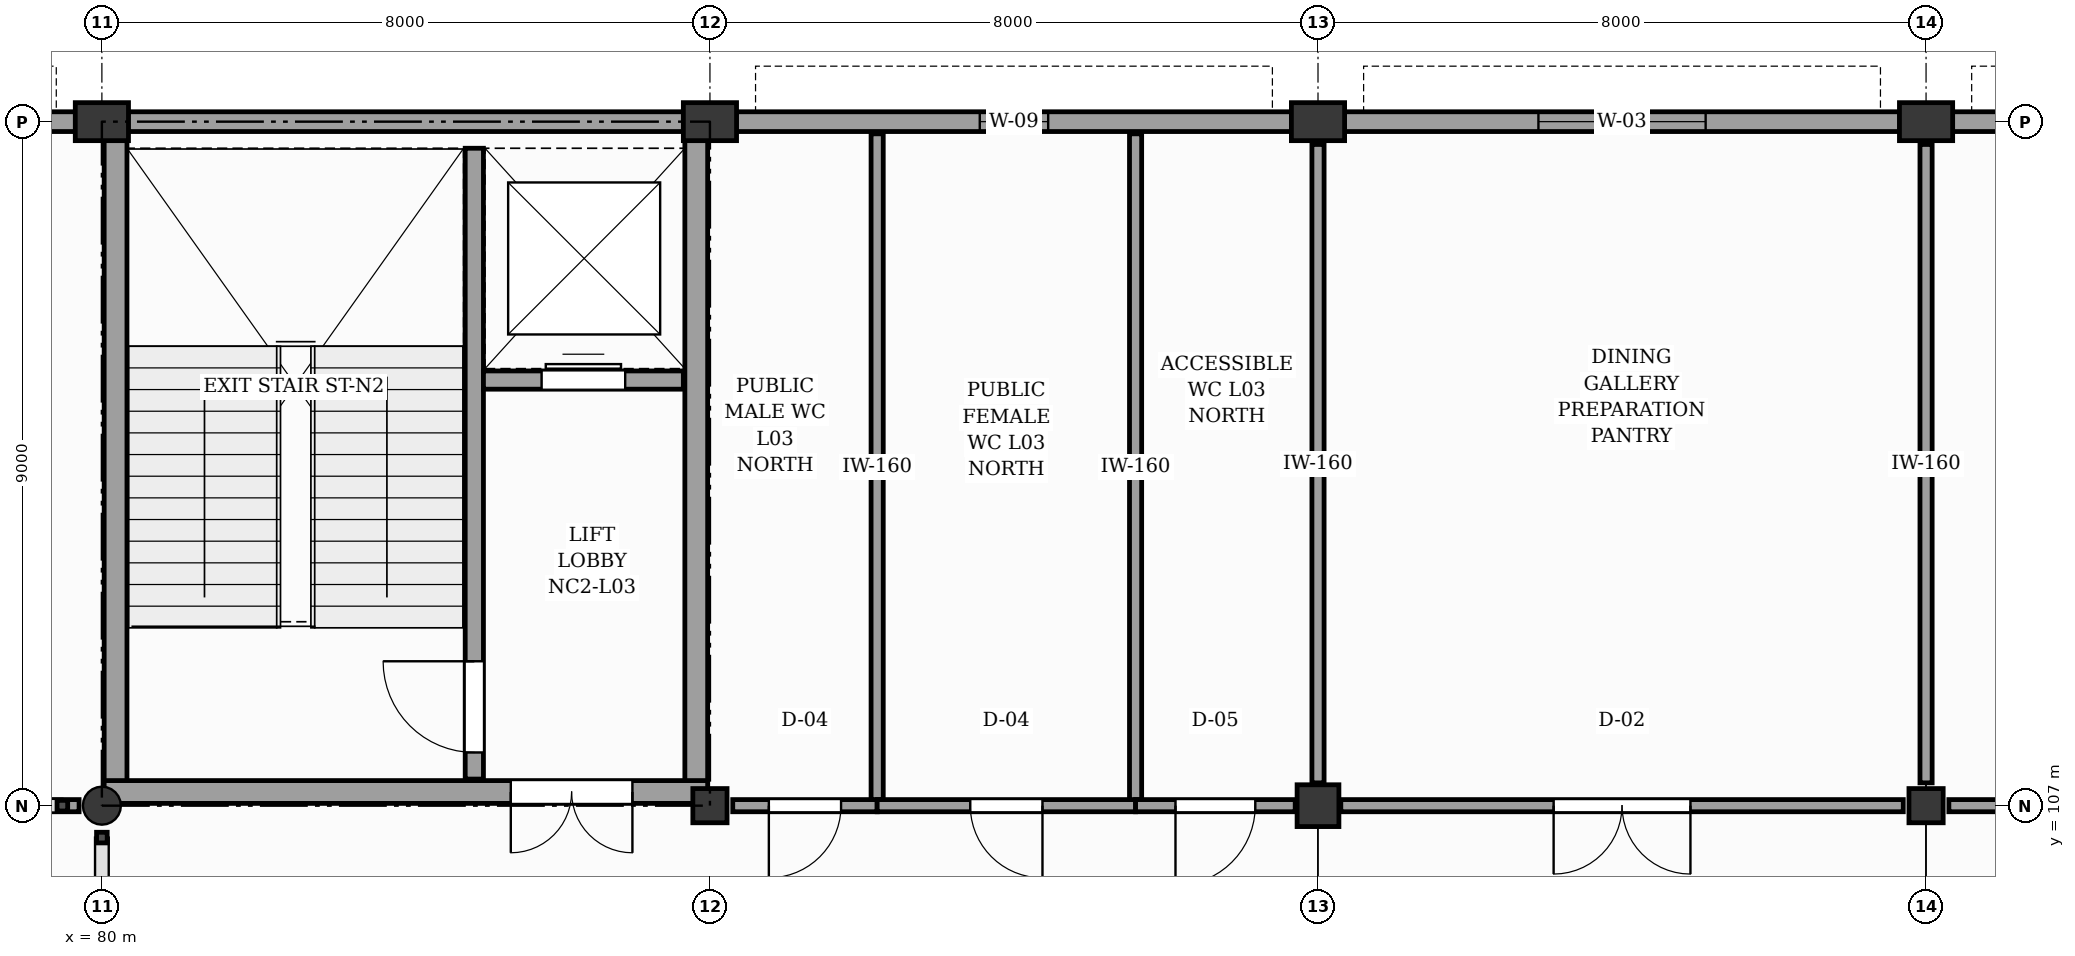
"""IFC4 building model, lengths in metres.
Left out: names, types, materials, properties, quantities, classifications, styles, units other than length and angle.
Written with IfcOpenShell. Run it as: python <this file> out.ifc"""

import sys

from ifc_helpers import new_model, si_unit, direction, frame, frame_2d, origin, origin_2d, place, context, subcontext, project, spatial, rectangle, circle, extrude, element, fill, save


model = new_model("IFC4")
c1 = context("Model", 3, precision=1e-05, world=origin(), true_north=direction((0.0, 1.0)))
c2 = subcontext(c1, "Body", "Model", "MODEL_VIEW")
j1 = project(units=[si_unit("LENGTHUNIT", "METRE"), si_unit("PLANEANGLEUNIT", "RADIAN")], contexts=[c1])
p1 = place(None, origin())
s1 = spatial("IfcSite", under=j1, at=p1, CompositionType="ELEMENT")
p2 = place(p1, origin())
s2 = spatial("IfcBuilding", under=s1, at=p2, CompositionType="ELEMENT")
p3 = place(p2, frame((0.0, 0.0, 16.2)))
s3 = spatial("IfcBuildingStorey", under=s2, at=p3, CompositionType="ELEMENT", Elevation=16.2)
p4 = place(p3, frame((80.0, 107.0, 0.0), z_axis=(0.0, 0.0, 1.0), x_axis=(1.0, 0.0, 0.0)))
e1 = element("IfcColumn", 1, at=p4, inside=s3, PredefinedType="COLUMN", context=c2, shape_type="SweptSolid", body=[
    extrude(circle(Radius=0.25, at=origin_2d()), origin(), (0.0, 0.0, 1.0), 4.2),
])
p5 = place(p3, frame((80.0, 116.0, 0.0), z_axis=(0.0, 0.0, 1.0), x_axis=(1.0, 0.0, 0.0)))
e2 = element("IfcColumn", 2, at=p5, inside=s3, PredefinedType="PILASTER", context=c2, shape_type="SweptSolid", body=[
    extrude(rectangle(XDim=0.7, YDim=0.5, at=origin_2d()), origin(), (0.0, 0.0, 1.0), 4.2),
])
p6 = place(p3, frame((88.0, 107.0, 0.0), z_axis=(0.0, 0.0, 1.0), x_axis=(1.0, 0.0, 0.0)))
e3 = element("IfcColumn", 3, at=p6, inside=s3, PredefinedType="COLUMN", context=c2, shape_type="SweptSolid", body=[
    extrude(rectangle(XDim=0.45, YDim=0.45, at=origin_2d()), origin(), (0.0, 0.0, 1.0), 4.2),
])
p7 = place(p3, frame((88.0, 116.0, 0.0), z_axis=(0.0, 0.0, 1.0), x_axis=(1.0, 0.0, 0.0)))
e4 = element("IfcColumn", 4, at=p7, inside=s3, PredefinedType="PILASTER", context=c2, shape_type="SweptSolid", body=[
    extrude(rectangle(XDim=0.7, YDim=0.5, at=origin_2d()), origin(), (0.0, 0.0, 1.0), 4.2),
])
p8 = place(p3, frame((96.0, 107.0, 0.0), z_axis=(0.0, 0.0, 1.0), x_axis=(1.0, 0.0, 0.0)))
e5 = element("IfcColumn", 5, at=p8, inside=s3, PredefinedType="COLUMN", context=c2, shape_type="SweptSolid", body=[
    extrude(rectangle(XDim=0.55, YDim=0.55, at=origin_2d()), origin(), (0.0, 0.0, 1.0), 4.2),
])
p9 = place(p3, frame((96.0, 116.0, 0.0), z_axis=(0.0, 0.0, 1.0), x_axis=(1.0, 0.0, 0.0)))
e6 = element("IfcColumn", 6, at=p9, inside=s3, PredefinedType="PILASTER", context=c2, shape_type="SweptSolid", body=[
    extrude(rectangle(XDim=0.7, YDim=0.5, at=origin_2d()), origin(), (0.0, 0.0, 1.0), 4.2),
])
p10 = place(p3, frame((104.0, 107.0, 0.0), z_axis=(0.0, 0.0, 1.0), x_axis=(1.0, 0.0, 0.0)))
e7 = element("IfcColumn", 7, at=p10, inside=s3, PredefinedType="COLUMN", context=c2, shape_type="SweptSolid", body=[
    extrude(rectangle(XDim=0.45, YDim=0.45, at=origin_2d()), origin(), (0.0, 0.0, 1.0), 4.2),
])
p11 = place(p3, frame((104.0, 116.0, 0.0), z_axis=(0.0, 0.0, 1.0), x_axis=(1.0, 0.0, 0.0)))
e8 = element("IfcColumn", 8, at=p11, inside=s3, PredefinedType="PILASTER", context=c2, shape_type="SweptSolid", body=[
    extrude(rectangle(XDim=0.7, YDim=0.5, at=origin_2d()), origin(), (0.0, 0.0, 1.0), 4.2),
])
p12 = place(p3, frame((72.345, 116.0, 0.0), z_axis=(0.0, 0.0, 1.0), x_axis=(1.0, 0.0, 0.0)))
e9 = element("IfcWall", 9, at=p12, inside=s3, PredefinedType="SOLIDWALL", context=c2, shape_type="SweptSolid", body=[
    extrude(rectangle(XDim=7.31, YDim=0.26, at=frame_2d((3.655, 0.0))), origin(), (0.0, 0.0, 1.0), 3.21),
])
p13 = place(p12, frame((2.555, 0.0, 0.9)))
e10 = element("IfcOpeningElement", 10, at=p13, cuts=e9, PredefinedType="OPENING", context=c2, shape_type="SweptSolid", body=[
    extrude(rectangle(XDim=2.2, YDim=1.99, at=frame_2d((1.1, 0.995))), frame((0.0, 0.14, 0.0), z_axis=(0.0, -1.0, 0.0), x_axis=(1.0, 0.0, 0.0)), (0.0, 0.0, 1.0), 0.28),
])
p14 = place(p3, frame((80.345, 116.0, 0.0), z_axis=(0.0, 0.0, 1.0), x_axis=(1.0, 0.0, 0.0)))
e11 = element("IfcWall", 11, at=p14, inside=s3, PredefinedType="SOLIDWALL", context=c2, shape_type="SweptSolid", body=[
    extrude(rectangle(XDim=7.31, YDim=0.26, at=frame_2d((3.655, 0.0))), origin(), (0.0, 0.0, 1.0), 3.21),
])
p15 = place(p3, frame((88.345, 116.0, 0.0), z_axis=(0.0, 0.0, 1.0), x_axis=(1.0, 0.0, 0.0)))
e12 = element("IfcWall", 12, at=p15, inside=s3, PredefinedType="SOLIDWALL", context=c2, shape_type="SweptSolid", body=[
    extrude(rectangle(XDim=7.31, YDim=0.26, at=frame_2d((3.655, 0.0))), origin(), (0.0, 0.0, 1.0), 3.21),
])
p16 = place(p15, frame((3.205, 0.0, 0.9)))
e13 = element("IfcOpeningElement", 13, at=p16, cuts=e12, PredefinedType="OPENING", context=c2, shape_type="SweptSolid", body=[
    extrude(rectangle(XDim=0.9, YDim=1.1, at=frame_2d((0.45, 0.55))), frame((0.0, 0.14, 0.0), z_axis=(0.0, -1.0, 0.0), x_axis=(1.0, 0.0, 0.0)), (0.0, 0.0, 1.0), 0.28),
])
p17 = place(p3, frame((96.345, 116.0, 0.0), z_axis=(0.0, 0.0, 1.0), x_axis=(1.0, 0.0, 0.0)))
e14 = element("IfcWall", 14, at=p17, inside=s3, PredefinedType="SOLIDWALL", context=c2, shape_type="SweptSolid", body=[
    extrude(rectangle(XDim=7.31, YDim=0.26, at=frame_2d((3.655, 0.0))), origin(), (0.0, 0.0, 1.0), 3.21),
])
p18 = place(p17, frame((2.555, 0.0, 0.9)))
e15 = element("IfcOpeningElement", 15, at=p18, cuts=e14, PredefinedType="OPENING", context=c2, shape_type="SweptSolid", body=[
    extrude(rectangle(XDim=2.2, YDim=1.99, at=frame_2d((1.1, 0.995))), frame((0.0, 0.14, 0.0), z_axis=(0.0, -1.0, 0.0), x_axis=(1.0, 0.0, 0.0)), (0.0, 0.0, 1.0), 0.28),
])
p19 = place(p3, frame((104.345, 116.0, 0.0), z_axis=(0.0, 0.0, 1.0), x_axis=(1.0, 0.0, 0.0)))
e16 = element("IfcWall", 16, at=p19, inside=s3, PredefinedType="SOLIDWALL", context=c2, shape_type="SweptSolid", body=[
    extrude(rectangle(XDim=7.31, YDim=0.26, at=frame_2d((3.655, 0.0))), origin(), (0.0, 0.0, 1.0), 3.21),
])
p20 = place(p19, frame((2.555, 0.0, 0.9)))
e17 = element("IfcOpeningElement", 17, at=p20, cuts=e16, PredefinedType="OPENING", context=c2, shape_type="SweptSolid", body=[
    extrude(rectangle(XDim=2.2, YDim=1.99, at=frame_2d((1.1, 0.995))), frame((0.0, 0.14, 0.0), z_axis=(0.0, -1.0, 0.0), x_axis=(1.0, 0.0, 0.0)), (0.0, 0.0, 1.0), 0.28),
])
p21 = place(p3, frame((84.9, 107.35, 0.0), z_axis=(0.0, 0.0, 1.0), x_axis=(0.0, 1.0, 0.0)))
e18 = element("IfcWall", 18, at=p21, inside=s3, PredefinedType="SHEAR", context=c2, shape_type="SweptSolid", body=[
    extrude(rectangle(XDim=8.3, YDim=0.24, at=frame_2d((4.15, 0.0))), origin(), (0.0, 0.0, 1.0), 3.92),
])
p22 = place(p21, frame((0.35, 0.0, 0.0)))
e19 = element("IfcOpeningElement", 19, at=p22, cuts=e18, PredefinedType="OPENING", context=c2, shape_type="SweptSolid", body=[
    extrude(rectangle(XDim=1.2, YDim=2.15, at=frame_2d((0.6, 1.075))), frame((0.0, 0.13, 0.0), z_axis=(0.0, -1.0, 0.0), x_axis=(1.0, 0.0, 0.0)), (0.0, 0.0, 1.0), 0.26),
])
p23 = place(p3, frame((85.02, 112.6, 0.0), z_axis=(0.0, 0.0, 1.0), x_axis=(1.0, 0.0, 0.0)))
e20 = element("IfcWall", 20, at=p23, inside=s3, PredefinedType="SHEAR", context=c2, shape_type="SweptSolid", body=[
    extrude(rectangle(XDim=2.63, YDim=0.24, at=frame_2d((1.315, 0.0))), origin(), (0.0, 0.0, 1.0), 3.92),
])
p24 = place(p23, frame((0.765, 0.0, 0.0)))
e21 = element("IfcOpeningElement", 21, at=p24, cuts=e20, PredefinedType="OPENING", context=c2, shape_type="SweptSolid", body=[
    extrude(rectangle(XDim=1.1, YDim=2.15, at=frame_2d((0.55, 1.075))), frame((0.0, 0.13, 0.0), z_axis=(0.0, -1.0, 0.0), x_axis=(1.0, 0.0, 0.0)), (0.0, 0.0, 1.0), 0.26),
])
for number, where, z_axis, x_axis in (
    (22, (80.18, 107.18, 0.0), (0.0, 0.0, 1.0), (0.0, 1.0, 0.0)),
    (23, (87.82, 107.18, 0.0), (0.0, 0.0, 1.0), (0.0, 1.0, 0.0)),
):
    element("IfcWall", number, at=place(p3, frame(where, z_axis=z_axis, x_axis=x_axis)), inside=s3, PredefinedType="SHEAR", context=c2, shape_type="SweptSolid", body=[
        extrude(rectangle(XDim=8.64, YDim=0.3, at=frame_2d((4.32, 0.0))), origin(), (0.0, 0.0, 1.0), 3.92),
    ])
p25 = place(p3, frame((80.03, 107.18, 0.0), z_axis=(0.0, 0.0, 1.0), x_axis=(1.0, 0.0, 0.0)))
e24 = element("IfcWall", 24, at=p25, inside=s3, PredefinedType="SHEAR", context=c2, shape_type="SweptSolid", body=[
    extrude(rectangle(XDim=7.94, YDim=0.3, at=frame_2d((3.97, 0.0))), origin(), (0.0, 0.0, 1.0), 3.92),
])
p26 = place(p25, frame((5.35, 0.0, 0.0)))
e25 = element("IfcOpeningElement", 25, at=p26, cuts=e24, PredefinedType="OPENING", context=c2, shape_type="SweptSolid", body=[
    extrude(rectangle(XDim=1.6, YDim=2.15, at=frame_2d((0.8, 1.075))), frame((0.0, 0.16, 0.0), z_axis=(0.0, -1.0, 0.0), x_axis=(1.0, 0.0, 0.0)), (0.0, 0.0, 1.0), 0.32),
])
p27 = place(p3, frame((76.0, 107.0, 0.0), z_axis=(0.0, 0.0, 1.0), x_axis=(1.0, 0.0, 0.0)))
e26 = element("IfcWall", 26, at=p27, inside=s3, PredefinedType="PARTITIONING", context=c2, shape_type="SweptSolid", body=[
    extrude(rectangle(XDim=3.7, YDim=0.16, at=frame_2d((1.85, 0.0))), origin(), (0.0, 0.0, 1.0), 3.1),
])
p28 = place(p27, frame((0.2, 0.0, 0.0)))
e27 = element("IfcOpeningElement", 27, at=p28, cuts=e26, PredefinedType="OPENING", context=c2, shape_type="SweptSolid", body=[
    extrude(rectangle(XDim=1.8, YDim=2.25, at=frame_2d((0.9, 1.125))), frame((0.0, 0.09, 0.0), z_axis=(0.0, -1.0, 0.0), x_axis=(1.0, 0.0, 0.0)), (0.0, 0.0, 1.0), 0.18),
])
p29 = place(p3, frame((88.3, 107.0, 0.0), z_axis=(0.0, 0.0, 1.0), x_axis=(1.0, 0.0, 0.0)))
e28 = element("IfcWall", 28, at=p29, inside=s3, PredefinedType="PARTITIONING", context=c2, shape_type="SweptSolid", body=[
    extrude(rectangle(XDim=1.9, YDim=0.16, at=frame_2d((0.95, 0.0))), origin(), (0.0, 0.0, 1.0), 3.1),
])
p30 = place(p29, frame((0.475, 0.0, 0.0)))
e29 = element("IfcOpeningElement", 29, at=p30, cuts=e28, PredefinedType="OPENING", context=c2, shape_type="SweptSolid", body=[
    extrude(rectangle(XDim=0.95, YDim=2.1, at=frame_2d((0.475, 1.05))), frame((0.0, 0.09, 0.0), z_axis=(0.0, -1.0, 0.0), x_axis=(1.0, 0.0, 0.0)), (0.0, 0.0, 1.0), 0.18),
])
p31 = place(p3, frame((90.2, 107.08, 0.0), z_axis=(0.0, 0.0, 1.0), x_axis=(0.0, 1.0, 0.0)))
e30 = element("IfcWall", 30, at=p31, inside=s3, PredefinedType="PARTITIONING", context=c2, shape_type="SweptSolid", body=[
    extrude(rectangle(XDim=8.76, YDim=0.16, at=frame_2d((4.38, 0.0))), origin(), (0.0, 0.0, 1.0), 3.1),
])
p32 = place(p3, frame((90.2, 107.0, 0.0), z_axis=(0.0, 0.0, 1.0), x_axis=(1.0, 0.0, 0.0)))
e31 = element("IfcWall", 31, at=p32, inside=s3, PredefinedType="PARTITIONING", context=c2, shape_type="SweptSolid", body=[
    extrude(rectangle(XDim=3.4, YDim=0.16, at=frame_2d((1.7, 0.0))), origin(), (0.0, 0.0, 1.0), 3.1),
])
p33 = place(p32, frame((1.225, 0.0, 0.0)))
e32 = element("IfcOpeningElement", 32, at=p33, cuts=e31, PredefinedType="OPENING", context=c2, shape_type="SweptSolid", body=[
    extrude(rectangle(XDim=0.95, YDim=2.1, at=frame_2d((0.475, 1.05))), frame((0.0, 0.09, 0.0), z_axis=(0.0, -1.0, 0.0), x_axis=(1.0, 0.0, 0.0)), (0.0, 0.0, 1.0), 0.18),
])
p34 = place(p3, frame((93.6, 107.08, 0.0), z_axis=(0.0, 0.0, 1.0), x_axis=(0.0, 1.0, 0.0)))
e33 = element("IfcWall", 33, at=p34, inside=s3, PredefinedType="PARTITIONING", context=c2, shape_type="SweptSolid", body=[
    extrude(rectangle(XDim=8.76, YDim=0.16, at=frame_2d((4.38, 0.0))), origin(), (0.0, 0.0, 1.0), 3.1),
])
p35 = place(p3, frame((93.6, 107.0, 0.0), z_axis=(0.0, 0.0, 1.0), x_axis=(1.0, 0.0, 0.0)))
e34 = element("IfcWall", 34, at=p35, inside=s3, PredefinedType="PARTITIONING", context=c2, shape_type="SweptSolid", body=[
    extrude(rectangle(XDim=2.1, YDim=0.16, at=frame_2d((1.05, 0.0))), origin(), (0.0, 0.0, 1.0), 3.1),
])
p36 = place(p35, frame((0.525, 0.0, 0.0)))
e35 = element("IfcOpeningElement", 35, at=p36, cuts=e34, PredefinedType="OPENING", context=c2, shape_type="SweptSolid", body=[
    extrude(rectangle(XDim=1.05, YDim=2.1, at=frame_2d((0.525, 1.05))), frame((0.0, 0.09, 0.0), z_axis=(0.0, -1.0, 0.0), x_axis=(1.0, 0.0, 0.0)), (0.0, 0.0, 1.0), 0.18),
])
p37 = place(p3, frame((96.0, 107.3, 0.0), z_axis=(0.0, 0.0, 1.0), x_axis=(0.0, 1.0, 0.0)))
e36 = element("IfcWall", 36, at=p37, inside=s3, PredefinedType="PARTITIONING", context=c2, shape_type="SweptSolid", body=[
    extrude(rectangle(XDim=8.4, YDim=0.16, at=frame_2d((4.2, 0.0))), origin(), (0.0, 0.0, 1.0), 3.1),
])
p38 = place(p3, frame((96.3, 107.0, 0.0), z_axis=(0.0, 0.0, 1.0), x_axis=(1.0, 0.0, 0.0)))
e37 = element("IfcWall", 37, at=p38, inside=s3, PredefinedType="PARTITIONING", context=c2, shape_type="SweptSolid", body=[
    extrude(rectangle(XDim=7.4, YDim=0.16, at=frame_2d((3.7, 0.0))), origin(), (0.0, 0.0, 1.0), 3.1),
])
p39 = place(p38, frame((2.8, 0.0, 0.0)))
e38 = element("IfcOpeningElement", 38, at=p39, cuts=e37, PredefinedType="OPENING", context=c2, shape_type="SweptSolid", body=[
    extrude(rectangle(XDim=1.8, YDim=2.25, at=frame_2d((0.9, 1.125))), frame((0.0, 0.09, 0.0), z_axis=(0.0, -1.0, 0.0), x_axis=(1.0, 0.0, 0.0)), (0.0, 0.0, 1.0), 0.18),
])
p40 = place(p3, frame((104.0, 107.3, 0.0), z_axis=(0.0, 0.0, 1.0), x_axis=(0.0, 1.0, 0.0)))
e39 = element("IfcWall", 39, at=p40, inside=s3, PredefinedType="PARTITIONING", context=c2, shape_type="SweptSolid", body=[
    extrude(rectangle(XDim=8.4, YDim=0.16, at=frame_2d((4.2, 0.0))), origin(), (0.0, 0.0, 1.0), 3.1),
])
p41 = place(p3, frame((104.3, 107.0, 0.0), z_axis=(0.0, 0.0, 1.0), x_axis=(1.0, 0.0, 0.0)))
e40 = element("IfcWall", 40, at=p41, inside=s3, PredefinedType="PARTITIONING", context=c2, shape_type="SweptSolid", body=[
    extrude(rectangle(XDim=7.4, YDim=0.16, at=frame_2d((3.7, 0.0))), origin(), (0.0, 0.0, 1.0), 3.1),
])
p42 = place(p41, frame((3.2, 0.0, 0.0)))
e41 = element("IfcOpeningElement", 41, at=p42, cuts=e40, PredefinedType="OPENING", context=c2, shape_type="SweptSolid", body=[
    extrude(rectangle(XDim=1.0, YDim=2.1, at=frame_2d((0.5, 1.05))), frame((0.0, 0.09, 0.0), z_axis=(0.0, -1.0, 0.0), x_axis=(1.0, 0.0, 0.0)), (0.0, 0.0, 1.0), 0.18),
])
p43 = place(p16, origin())
e42 = element("IfcWindow", 42, at=p43, inside=s3, PartitioningType="SINGLE_PANEL", PredefinedType="WINDOW", context=c2, shape_type="SweptSolid", body=[
    extrude(rectangle(XDim=0.9, YDim=1.1, at=frame_2d((0.45, 0.55))), frame((0.0, 0.03, 0.0), z_axis=(0.0, -1.0, 0.0), x_axis=(1.0, 0.0, 0.0)), (0.0, 0.0, 1.0), 0.06),
])
fill(e13, e42)
p44 = place(p18, origin())
e43 = element("IfcWindow", 43, at=p44, inside=s3, PartitioningType="SINGLE_PANEL", PredefinedType="WINDOW", context=c2, shape_type="SweptSolid", body=[
    extrude(rectangle(XDim=2.2, YDim=1.99, at=frame_2d((1.1, 0.995))), frame((0.0, 0.03, 0.0), z_axis=(0.0, -1.0, 0.0), x_axis=(1.0, 0.0, 0.0)), (0.0, 0.0, 1.0), 0.06),
])
fill(e15, e43)
p45 = place(p22, origin())
e44 = element("IfcDoor", 44, at=p45, inside=s3, OperationType="SINGLE_SWING_RIGHT", PredefinedType="DOOR", context=c2, shape_type="SweptSolid", body=[
    extrude(rectangle(XDim=1.2, YDim=2.15, at=frame_2d((0.6, 1.075))), frame((0.0, 0.025, 0.0), z_axis=(0.0, -1.0, 0.0), x_axis=(1.0, 0.0, 0.0)), (0.0, 0.0, 1.0), 0.05),
])
fill(e19, e44)
p46 = place(p24, origin())
e45 = element("IfcDoor", 45, at=p46, inside=s3, OperationType="DOUBLE_DOOR_SLIDING", PredefinedType="DOOR", context=c2, shape_type="SweptSolid", body=[
    extrude(rectangle(XDim=1.1, YDim=2.15, at=frame_2d((0.55, 1.075))), frame((0.0, 0.025, 0.0), z_axis=(0.0, -1.0, 0.0), x_axis=(1.0, 0.0, 0.0)), (0.0, 0.0, 1.0), 0.05),
])
fill(e21, e45)
p47 = place(p26, frame((1.6, 0.0, 0.0), z_axis=(0.0, 0.0, 1.0), x_axis=(-1.0, 0.0, 0.0)))
e46 = element("IfcDoor", 46, at=p47, inside=s3, OperationType="DOUBLE_DOOR_SINGLE_SWING", PredefinedType="DOOR", context=c2, shape_type="SweptSolid", body=[
    extrude(rectangle(XDim=1.6, YDim=2.15, at=frame_2d((0.8, 1.075))), frame((0.0, 0.025, 0.0), z_axis=(0.0, -1.0, 0.0), x_axis=(1.0, 0.0, 0.0)), (0.0, 0.0, 1.0), 0.05),
])
fill(e25, e46)
p48 = place(p30, frame((0.95, 0.0, 0.0), z_axis=(0.0, 0.0, 1.0), x_axis=(-1.0, 0.0, 0.0)))
e47 = element("IfcDoor", 47, at=p48, inside=s3, OperationType="SINGLE_SWING_LEFT", PredefinedType="DOOR", context=c2, shape_type="SweptSolid", body=[
    extrude(rectangle(XDim=0.95, YDim=2.1, at=frame_2d((0.475, 1.05))), frame((0.0, 0.025, 0.0), z_axis=(0.0, -1.0, 0.0), x_axis=(1.0, 0.0, 0.0)), (0.0, 0.0, 1.0), 0.05),
])
fill(e29, e47)
p49 = place(p33, frame((0.95, 0.0, 0.0), z_axis=(0.0, 0.0, 1.0), x_axis=(-1.0, 0.0, 0.0)))
e48 = element("IfcDoor", 48, at=p49, inside=s3, OperationType="SINGLE_SWING_RIGHT", PredefinedType="DOOR", context=c2, shape_type="SweptSolid", body=[
    extrude(rectangle(XDim=0.95, YDim=2.1, at=frame_2d((0.475, 1.05))), frame((0.0, 0.025, 0.0), z_axis=(0.0, -1.0, 0.0), x_axis=(1.0, 0.0, 0.0)), (0.0, 0.0, 1.0), 0.05),
])
fill(e32, e48)
p50 = place(p36, frame((1.05, 0.0, 0.0), z_axis=(0.0, 0.0, 1.0), x_axis=(-1.0, 0.0, 0.0)))
e49 = element("IfcDoor", 49, at=p50, inside=s3, OperationType="SINGLE_SWING_LEFT", PredefinedType="DOOR", context=c2, shape_type="SweptSolid", body=[
    extrude(rectangle(XDim=1.05, YDim=2.1, at=frame_2d((0.525, 1.05))), frame((0.0, 0.025, 0.0), z_axis=(0.0, -1.0, 0.0), x_axis=(1.0, 0.0, 0.0)), (0.0, 0.0, 1.0), 0.05),
])
fill(e35, e49)
p51 = place(p39, frame((1.8, 0.0, 0.0), z_axis=(0.0, 0.0, 1.0), x_axis=(-1.0, 0.0, 0.0)))
e50 = element("IfcDoor", 50, at=p51, inside=s3, OperationType="DOUBLE_DOOR_SINGLE_SWING", PredefinedType="DOOR", context=c2, shape_type="SweptSolid", body=[
    extrude(rectangle(XDim=1.8, YDim=2.25, at=frame_2d((0.9, 1.125))), frame((0.0, 0.025, 0.0), z_axis=(0.0, -1.0, 0.0), x_axis=(1.0, 0.0, 0.0)), (0.0, 0.0, 1.0), 0.05),
])
fill(e38, e50)
save(model, sys.argv[1])
